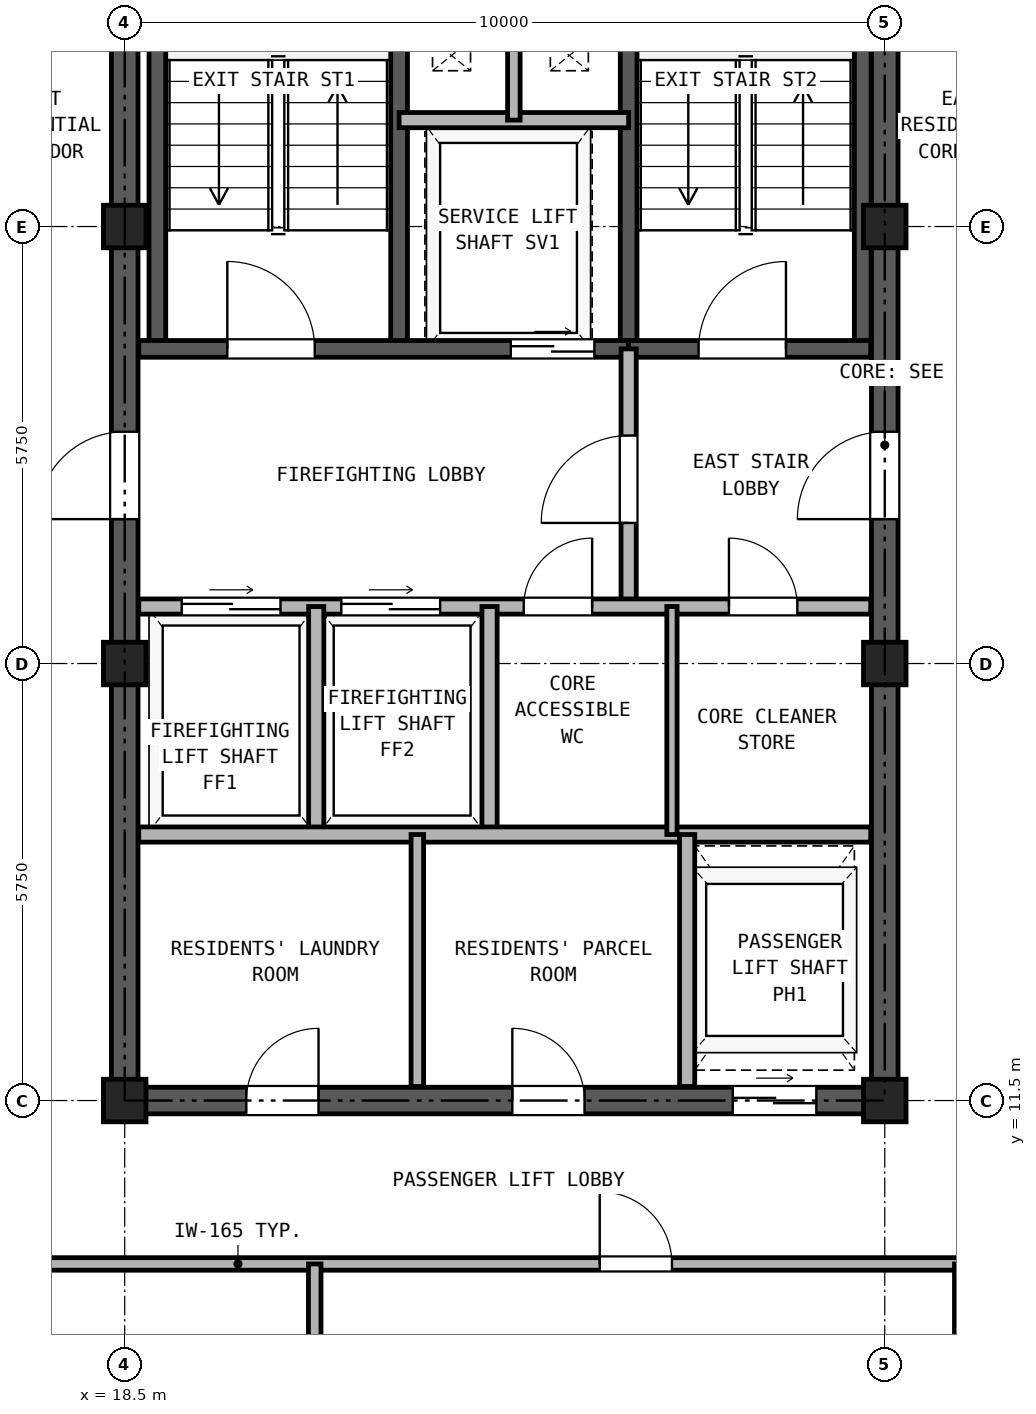
"""IFC4 building model, lengths in metres.
Left out: names, types, materials, properties, quantities, classifications, styles, units other than length and angle.
Written with IfcOpenShell. Run it as: python <this file> out.ifc"""

import sys

from ifc_helpers import new_model, si_unit, direction, frame, frame_2d, origin, origin_2d, place, context, subcontext, project, spatial, rectangle, hollow_rectangle, extrude, source, transform, mapped, element, fill, save


model = new_model("IFC4")
c1 = context("Model", 3, precision=1e-05, world=origin(), true_north=direction((0.0, 1.0)))
c2 = subcontext(c1, "Body", "Model", "MODEL_VIEW")
j1 = project(units=[si_unit("LENGTHUNIT", "METRE"), si_unit("PLANEANGLEUNIT", "RADIAN")], contexts=[c1])
p1 = place(None, origin())
s1 = spatial("IfcSite", under=j1, at=p1, CompositionType="ELEMENT")
p2 = place(p1, origin())
s2 = spatial("IfcBuilding", under=s1, at=p2, CompositionType="ELEMENT")
p3 = place(p2, frame((0.0, 0.0, 264.9)))
s3 = spatial("IfcBuildingStorey", under=s2, at=p3, CompositionType="ELEMENT", Elevation=264.9)
m1 = source(origin(), c2, "Body", "SweptSolid", [
    extrude(hollow_rectangle(XDim=0.56, YDim=0.56, WallThickness=0.03, at=origin_2d()), origin(), (0.0, 0.0, 1.0), 2.98),
])
for number, where, z_axis, x_axis in (
    (1, (18.5, 11.5, 0.0), (0.0, 0.0, 1.0), (1.0, 0.0, 0.0)),
    (2, (18.5, 17.25, 0.0), (0.0, 0.0, 1.0), (1.0, 0.0, 0.0)),
    (3, (18.5, 23.0, 0.0), (0.0, 0.0, 1.0), (1.0, 0.0, 0.0)),
    (4, (28.5, 11.5, 0.0), (0.0, 0.0, 1.0), (1.0, 0.0, 0.0)),
    (5, (28.5, 17.25, 0.0), (0.0, 0.0, 1.0), (1.0, 0.0, 0.0)),
    (6, (28.5, 23.0, 0.0), (0.0, 0.0, 1.0), (1.0, 0.0, 0.0)),
):
    element("IfcColumn", number, at=place(p3, frame(where, z_axis=z_axis, x_axis=x_axis)), inside=s3, PredefinedType="COLUMN", context=c2, shape_type="MappedRepresentation", body=[
        mapped(m1, transform((0.0, 0.0, 0.0), x_axis=(1.0, 0.0, 0.0), y_axis=(0.0, 1.0, 0.0), z_axis=(0.0, 0.0, 1.0), scale=1.0)),
    ])
p4 = place(p3, frame((18.325, 11.5, 0.0), z_axis=(0.0, 0.0, 1.0), x_axis=(1.0, 0.0, 0.0)))
e7 = element("IfcWall", 7, at=p4, inside=s3, PredefinedType="SHEAR", context=c2, shape_type="SweptSolid", body=[
    extrude(rectangle(XDim=10.35, YDim=0.35, at=frame_2d((5.175, 0.0))), origin(), (0.0, 0.0, 1.0), 2.98),
])
p5 = place(p4, frame((1.775, 0.0, 0.0)))
e8 = element("IfcOpeningElement", 8, at=p5, cuts=e7, PredefinedType="OPENING", context=c2, shape_type="SweptSolid", body=[
    extrude(rectangle(XDim=0.95, YDim=2.15, at=frame_2d((0.475, 1.075))), frame((0.0, 0.185, 0.0), z_axis=(0.0, -1.0, 0.0), x_axis=(1.0, 0.0, 0.0)), (0.0, 0.0, 1.0), 0.37),
])
p6 = place(p4, frame((5.275, 0.0, 0.0)))
e9 = element("IfcOpeningElement", 9, at=p6, cuts=e7, PredefinedType="OPENING", context=c2, shape_type="SweptSolid", body=[
    extrude(rectangle(XDim=0.95, YDim=2.15, at=frame_2d((0.475, 1.075))), frame((0.0, 0.185, 0.0), z_axis=(0.0, -1.0, 0.0), x_axis=(1.0, 0.0, 0.0)), (0.0, 0.0, 1.0), 0.37),
])
p7 = place(p4, frame((8.175, 0.0, 0.0)))
e10 = element("IfcOpeningElement", 10, at=p7, cuts=e7, PredefinedType="OPENING", context=c2, shape_type="SweptSolid", body=[
    extrude(rectangle(XDim=1.1, YDim=2.25, at=frame_2d((0.55, 1.125))), frame((0.0, 0.185, 0.0), z_axis=(0.0, -1.0, 0.0), x_axis=(1.0, 0.0, 0.0)), (0.0, 0.0, 1.0), 0.37),
])
p8 = place(p3, frame((18.5, 11.675, 0.0), z_axis=(0.0, 0.0, 1.0), x_axis=(0.0, 1.0, 0.0)))
e11 = element("IfcWall", 11, at=p8, inside=s3, PredefinedType="SHEAR", context=c2, shape_type="SweptSolid", body=[
    extrude(rectangle(XDim=16.9, YDim=0.35, at=frame_2d((8.45, 0.0))), origin(), (0.0, 0.0, 1.0), 2.98),
])
p9 = place(p8, frame((7.475, 0.0, 0.0)))
e12 = element("IfcOpeningElement", 12, at=p9, cuts=e11, PredefinedType="OPENING", context=c2, shape_type="SweptSolid", body=[
    extrude(rectangle(XDim=1.15, YDim=2.2, at=frame_2d((0.575, 1.1))), frame((0.0, 0.185, 0.0), z_axis=(0.0, -1.0, 0.0), x_axis=(1.0, 0.0, 0.0)), (0.0, 0.0, 1.0), 0.37),
])
p10 = place(p3, frame((28.5, 11.675, 0.0), z_axis=(0.0, 0.0, 1.0), x_axis=(0.0, 1.0, 0.0)))
e13 = element("IfcWall", 13, at=p10, inside=s3, PredefinedType="SHEAR", context=c2, shape_type="SweptSolid", body=[
    extrude(rectangle(XDim=16.9, YDim=0.35, at=frame_2d((8.45, 0.0))), origin(), (0.0, 0.0, 1.0), 2.98),
])
p11 = place(p10, frame((7.475, 0.0, 0.0)))
e14 = element("IfcOpeningElement", 14, at=p11, cuts=e13, PredefinedType="OPENING", context=c2, shape_type="SweptSolid", body=[
    extrude(rectangle(XDim=1.15, YDim=2.2, at=frame_2d((0.575, 1.1))), frame((0.0, 0.185, 0.0), z_axis=(0.0, -1.0, 0.0), x_axis=(1.0, 0.0, 0.0)), (0.0, 0.0, 1.0), 0.37),
])
for number, where, z_axis, x_axis in (
    (15, (18.93, 21.39, 0.0), (0.0, 0.0, 1.0), (0.0, 1.0, 0.0)),
    (16, (22.11, 21.39, 0.0), (0.0, 0.0, 1.0), (0.0, 1.0, 0.0)),
    (17, (25.13, 21.39, 0.0), (0.0, 0.0, 1.0), (0.0, 1.0, 0.0)),
):
    element("IfcWall", number, at=place(p3, frame(where, z_axis=z_axis, x_axis=x_axis)), inside=s3, PredefinedType="SOLIDWALL", context=c2, shape_type="SweptSolid", body=[
        extrude(rectangle(XDim=7.11, YDim=0.22, at=frame_2d((3.555, 0.0))), origin(), (0.0, 0.0, 1.0), 2.98),
    ])
p12 = place(p3, frame((28.21, 21.39, 0.0), z_axis=(0.0, 0.0, 1.0), x_axis=(0.0, 1.0, 0.0)))
e18 = element("IfcWall", 18, at=p12, inside=s3, PredefinedType="SOLIDWALL", context=c2, shape_type="SweptSolid", body=[
    extrude(rectangle(XDim=6.945, YDim=0.22, at=frame_2d((3.473, 0.0))), origin(), (0.0, 0.0, 1.0), 2.98),
])
p13 = place(p3, frame((18.685, 21.39, 0.0), z_axis=(0.0, 0.0, 1.0), x_axis=(1.0, 0.0, 0.0)))
e19 = element("IfcWall", 19, at=p13, inside=s3, PredefinedType="SOLIDWALL", context=c2, shape_type="SweptSolid", body=[
    extrude(rectangle(XDim=6.445, YDim=0.22, at=frame_2d((3.222, 0.0))), origin(), (0.0, 0.0, 1.0), 2.98),
])
p14 = place(p13, frame((1.165, 0.0, 0.0)))
e20 = element("IfcOpeningElement", 20, at=p14, cuts=e19, PredefinedType="OPENING", context=c2, shape_type="SweptSolid", body=[
    extrude(rectangle(XDim=1.15, YDim=2.2, at=frame_2d((0.575, 1.1))), frame((0.0, 0.12, 0.0), z_axis=(0.0, -1.0, 0.0), x_axis=(1.0, 0.0, 0.0)), (0.0, 0.0, 1.0), 0.24),
])
p15 = place(p13, frame((4.895, 0.0, 0.0)))
e21 = element("IfcOpeningElement", 21, at=p15, cuts=e19, PredefinedType="OPENING", context=c2, shape_type="SweptSolid", body=[
    extrude(rectangle(XDim=1.1, YDim=2.25, at=frame_2d((0.55, 1.125))), frame((0.0, 0.12, 0.0), z_axis=(0.0, -1.0, 0.0), x_axis=(1.0, 0.0, 0.0)), (0.0, 0.0, 1.0), 0.24),
])
p16 = place(p3, frame((25.13, 21.39, 0.0), z_axis=(0.0, 0.0, 1.0), x_axis=(1.0, 0.0, 0.0)))
e22 = element("IfcWall", 22, at=p16, inside=s3, PredefinedType="SOLIDWALL", context=c2, shape_type="SweptSolid", body=[
    extrude(rectangle(XDim=3.185, YDim=0.22, at=frame_2d((1.593, 0.0))), origin(), (0.0, 0.0, 1.0), 2.98),
])
p17 = place(p16, frame((0.92, 0.0, 0.0)))
e23 = element("IfcOpeningElement", 23, at=p17, cuts=e22, PredefinedType="OPENING", context=c2, shape_type="SweptSolid", body=[
    extrude(rectangle(XDim=1.15, YDim=2.2, at=frame_2d((0.575, 1.1))), frame((0.0, 0.12, 0.0), z_axis=(0.0, -1.0, 0.0), x_axis=(1.0, 0.0, 0.0)), (0.0, 0.0, 1.0), 0.24),
])
p18 = place(p3, frame((22.11, 24.4, 0.0), z_axis=(0.0, 0.0, 1.0), x_axis=(1.0, 0.0, 0.0)))
e24 = element("IfcWall", 24, at=p18, inside=s3, PredefinedType="PARTITIONING", context=c2, shape_type="SweptSolid", body=[
    extrude(rectangle(XDim=3.02, YDim=0.2, at=frame_2d((1.51, 0.0))), origin(), (0.0, 0.0, 1.0), 2.98),
])
p19 = place(p3, frame((23.62, 24.4, 0.0), z_axis=(0.0, 0.0, 1.0), x_axis=(0.0, 1.0, 0.0)))
e25 = element("IfcWall", 25, at=p19, inside=s3, PredefinedType="PARTITIONING", context=c2, shape_type="SweptSolid", body=[
    extrude(rectangle(XDim=4.165, YDim=0.165, at=frame_2d((2.083, 0.0))), origin(), (0.0, 0.0, 1.0), 2.98),
])
p20 = place(p3, frame((25.13, 18.0, 0.0), z_axis=(0.0, 0.0, 1.0), x_axis=(0.0, 1.0, 0.0)))
e26 = element("IfcWall", 26, at=p20, inside=s3, PredefinedType="PARTITIONING", context=c2, shape_type="SweptSolid", body=[
    extrude(rectangle(XDim=3.39, YDim=0.2, at=frame_2d((1.695, 0.0))), origin(), (0.0, 0.0, 1.0), 2.98),
])
p21 = place(p20, frame((1.1, 0.0, 0.0)))
e27 = element("IfcOpeningElement", 27, at=p21, cuts=e26, PredefinedType="OPENING", context=c2, shape_type="SweptSolid", body=[
    extrude(rectangle(XDim=1.15, YDim=2.2, at=frame_2d((0.575, 1.1))), frame((0.0, 0.11, 0.0), z_axis=(0.0, -1.0, 0.0), x_axis=(1.0, 0.0, 0.0)), (0.0, 0.0, 1.0), 0.22),
])
p22 = place(p3, frame((18.685, 18.0, 0.0), z_axis=(0.0, 0.0, 1.0), x_axis=(1.0, 0.0, 0.0)))
e28 = element("IfcWall", 28, at=p22, inside=s3, PredefinedType="PARTITIONING", context=c2, shape_type="SweptSolid", body=[
    extrude(rectangle(XDim=9.63, YDim=0.2, at=frame_2d((4.815, 0.0))), origin(), (0.0, 0.0, 1.0), 2.98),
])
p23 = place(p22, frame((0.565, 0.0, 0.0)))
e29 = element("IfcOpeningElement", 29, at=p23, cuts=e28, PredefinedType="OPENING", context=c2, shape_type="SweptSolid", body=[
    extrude(rectangle(XDim=1.3, YDim=2.3, at=frame_2d((0.65, 1.15))), frame((0.0, 0.11, 0.0), z_axis=(0.0, -1.0, 0.0), x_axis=(1.0, 0.0, 0.0)), (0.0, 0.0, 1.0), 0.22),
])
p24 = place(p22, frame((2.665, 0.0, 0.0)))
e30 = element("IfcOpeningElement", 30, at=p24, cuts=e28, PredefinedType="OPENING", context=c2, shape_type="SweptSolid", body=[
    extrude(rectangle(XDim=1.3, YDim=2.3, at=frame_2d((0.65, 1.15))), frame((0.0, 0.11, 0.0), z_axis=(0.0, -1.0, 0.0), x_axis=(1.0, 0.0, 0.0)), (0.0, 0.0, 1.0), 0.22),
])
p25 = place(p22, frame((5.065, 0.0, 0.0)))
e31 = element("IfcOpeningElement", 31, at=p25, cuts=e28, PredefinedType="OPENING", context=c2, shape_type="SweptSolid", body=[
    extrude(rectangle(XDim=0.9, YDim=2.05, at=frame_2d((0.45, 1.025))), frame((0.0, 0.11, 0.0), z_axis=(0.0, -1.0, 0.0), x_axis=(1.0, 0.0, 0.0)), (0.0, 0.0, 1.0), 0.22),
])
p26 = place(p22, frame((7.765, 0.0, 0.0)))
e32 = element("IfcOpeningElement", 32, at=p26, cuts=e28, PredefinedType="OPENING", context=c2, shape_type="SweptSolid", body=[
    extrude(rectangle(XDim=0.9, YDim=2.05, at=frame_2d((0.45, 1.025))), frame((0.0, 0.11, 0.0), z_axis=(0.0, -1.0, 0.0), x_axis=(1.0, 0.0, 0.0)), (0.0, 0.0, 1.0), 0.22),
])
for number, where, z_axis, x_axis in (
    (33, (21.02, 15.0, 0.0), (0.0, 0.0, 1.0), (0.0, 1.0, 0.0)),
    (34, (23.3, 15.0, 0.0), (0.0, 0.0, 1.0), (0.0, 1.0, 0.0)),
):
    element("IfcWall", number, at=place(p3, frame(where, z_axis=z_axis, x_axis=x_axis)), inside=s3, PredefinedType="PARTITIONING", context=c2, shape_type="SweptSolid", body=[
        extrude(rectangle(XDim=3.0, YDim=0.2, at=frame_2d((1.5, 0.0))), origin(), (0.0, 0.0, 1.0), 2.98),
    ])
p27 = place(p3, frame((18.685, 15.0, 0.0), z_axis=(0.0, 0.0, 1.0), x_axis=(1.0, 0.0, 0.0)))
e35 = element("IfcWall", 35, at=p27, inside=s3, PredefinedType="PARTITIONING", context=c2, shape_type="SweptSolid", body=[
    extrude(rectangle(XDim=9.63, YDim=0.2, at=frame_2d((4.815, 0.0))), origin(), (0.0, 0.0, 1.0), 2.98),
])
p28 = place(p3, frame((25.7, 15.0, 0.0), z_axis=(0.0, 0.0, 1.0), x_axis=(0.0, 1.0, 0.0)))
e36 = element("IfcWall", 36, at=p28, inside=s3, PredefinedType="PARTITIONING", context=c2, shape_type="SweptSolid", body=[
    extrude(rectangle(XDim=3.0, YDim=0.135, at=frame_2d((1.5, 0.0))), origin(), (0.0, 0.0, 1.0), 2.98),
])
p29 = place(p3, frame((22.35, 11.685, 0.0), z_axis=(0.0, 0.0, 1.0), x_axis=(0.0, 1.0, 0.0)))
e37 = element("IfcWall", 37, at=p29, inside=s3, PredefinedType="PARTITIONING", context=c2, shape_type="SweptSolid", body=[
    extrude(rectangle(XDim=3.315, YDim=0.165, at=frame_2d((1.657, 0.0))), origin(), (0.0, 0.0, 1.0), 2.98),
])
p30 = place(p3, frame((25.9, 11.685, 0.0), z_axis=(0.0, 0.0, 1.0), x_axis=(0.0, 1.0, 0.0)))
e38 = element("IfcWall", 38, at=p30, inside=s3, PredefinedType="PARTITIONING", context=c2, shape_type="SweptSolid", body=[
    extrude(rectangle(XDim=3.315, YDim=0.2, at=frame_2d((1.657, 0.0))), origin(), (0.0, 0.0, 1.0), 2.98),
])
p31 = place(p3, frame((5.36, 9.35, 0.0), z_axis=(0.0, 0.0, 1.0), x_axis=(1.0, 0.0, 0.0)))
e39 = element("IfcWall", 39, at=p31, inside=s3, PredefinedType="PARTITIONING", context=c2, shape_type="SweptSolid", body=[
    extrude(rectangle(XDim=36.28, YDim=0.165, at=frame_2d((18.14, 0.0))), origin(), (0.0, 0.0, 1.0), 2.98),
])
p32 = place(p31, frame((8.92, 0.0, 0.0)))
e40 = element("IfcOpeningElement", 40, at=p32, cuts=e39, PredefinedType="OPENING", context=c2, shape_type="SweptSolid", body=[
    extrude(rectangle(XDim=0.95, YDim=2.15, at=frame_2d((0.475, 1.075))), frame((0.0, 0.093, 0.0), z_axis=(0.0, -1.0, 0.0), x_axis=(1.0, 0.0, 0.0)), (0.0, 0.0, 1.0), 0.185),
])
p33 = place(p31, frame((19.39, 0.0, 0.0)))
e41 = element("IfcOpeningElement", 41, at=p33, cuts=e39, PredefinedType="OPENING", context=c2, shape_type="SweptSolid", body=[
    extrude(rectangle(XDim=0.95, YDim=2.15, at=frame_2d((0.475, 1.075))), frame((0.0, 0.093, 0.0), z_axis=(0.0, -1.0, 0.0), x_axis=(1.0, 0.0, 0.0)), (0.0, 0.0, 1.0), 0.185),
])
p34 = place(p31, frame((25.99, 0.0, 0.0)))
e42 = element("IfcOpeningElement", 42, at=p34, cuts=e39, PredefinedType="OPENING", context=c2, shape_type="SweptSolid", body=[
    extrude(rectangle(XDim=0.95, YDim=2.15, at=frame_2d((0.475, 1.075))), frame((0.0, 0.093, 0.0), z_axis=(0.0, -1.0, 0.0), x_axis=(1.0, 0.0, 0.0)), (0.0, 0.0, 1.0), 0.185),
])
p35 = place(p31, frame((30.34, 0.0, 0.0)))
e43 = element("IfcOpeningElement", 43, at=p35, cuts=e39, PredefinedType="OPENING", context=c2, shape_type="SweptSolid", body=[
    extrude(rectangle(XDim=0.95, YDim=2.15, at=frame_2d((0.475, 1.075))), frame((0.0, 0.093, 0.0), z_axis=(0.0, -1.0, 0.0), x_axis=(1.0, 0.0, 0.0)), (0.0, 0.0, 1.0), 0.185),
])
for number, where, z_axis, x_axis in (
    (44, (21.0, 0.16, 0.0), (0.0, 0.0, 1.0), (0.0, 1.0, 0.0)),
    (45, (29.5, 0.16, 0.0), (0.0, 0.0, 1.0), (0.0, 1.0, 0.0)),
):
    element("IfcWall", number, at=place(p3, frame(where, z_axis=z_axis, x_axis=x_axis)), inside=s3, PredefinedType="PARTITIONING", context=c2, shape_type="SweptSolid", body=[
        extrude(rectangle(XDim=9.19, YDim=0.165, at=frame_2d((4.595, 0.0))), origin(), (0.0, 0.0, 1.0), 2.98),
    ])
p36 = place(p14, frame((1.15, 0.0, 0.0), z_axis=(0.0, 0.0, 1.0), x_axis=(-1.0, 0.0, 0.0)))
e46 = element("IfcDoor", 46, at=p36, inside=s3, OperationType="SINGLE_SWING_LEFT", PredefinedType="DOOR", context=c2, shape_type="SweptSolid", body=[
    extrude(rectangle(XDim=1.15, YDim=2.2, at=frame_2d((0.575, 1.1))), frame((0.0, 0.025, 0.0), z_axis=(0.0, -1.0, 0.0), x_axis=(1.0, 0.0, 0.0)), (0.0, 0.0, 1.0), 0.05),
])
fill(e20, e46)
p37 = place(p17, frame((1.15, 0.0, 0.0), z_axis=(0.0, 0.0, 1.0), x_axis=(-1.0, 0.0, 0.0)))
e47 = element("IfcDoor", 47, at=p37, inside=s3, OperationType="SINGLE_SWING_RIGHT", PredefinedType="DOOR", context=c2, shape_type="SweptSolid", body=[
    extrude(rectangle(XDim=1.15, YDim=2.2, at=frame_2d((0.575, 1.1))), frame((0.0, 0.025, 0.0), z_axis=(0.0, -1.0, 0.0), x_axis=(1.0, 0.0, 0.0)), (0.0, 0.0, 1.0), 0.05),
])
fill(e23, e47)
p38 = place(p15, frame((1.1, 0.0, 0.0), z_axis=(0.0, 0.0, 1.0), x_axis=(-1.0, 0.0, 0.0)))
e48 = element("IfcDoor", 48, at=p38, inside=s3, OperationType="DOUBLE_DOOR_SLIDING", PredefinedType="DOOR", context=c2, shape_type="SweptSolid", body=[
    extrude(rectangle(XDim=1.1, YDim=2.25, at=frame_2d((0.55, 1.125))), frame((0.0, 0.025, 0.0), z_axis=(0.0, -1.0, 0.0), x_axis=(1.0, 0.0, 0.0)), (0.0, 0.0, 1.0), 0.05),
])
fill(e21, e48)
p39 = place(p21, origin())
e49 = element("IfcDoor", 49, at=p39, inside=s3, OperationType="SINGLE_SWING_LEFT", PredefinedType="DOOR", context=c2, shape_type="SweptSolid", body=[
    extrude(rectangle(XDim=1.15, YDim=2.2, at=frame_2d((0.575, 1.1))), frame((0.0, 0.025, 0.0), z_axis=(0.0, -1.0, 0.0), x_axis=(1.0, 0.0, 0.0)), (0.0, 0.0, 1.0), 0.05),
])
fill(e27, e49)
p40 = place(p23, origin())
e50 = element("IfcDoor", 50, at=p40, inside=s3, OperationType="DOUBLE_DOOR_SLIDING", PredefinedType="DOOR", context=c2, shape_type="SweptSolid", body=[
    extrude(rectangle(XDim=1.3, YDim=2.3, at=frame_2d((0.65, 1.15))), frame((0.0, 0.025, 0.0), z_axis=(0.0, -1.0, 0.0), x_axis=(1.0, 0.0, 0.0)), (0.0, 0.0, 1.0), 0.05),
])
fill(e29, e50)
p41 = place(p24, origin())
e51 = element("IfcDoor", 51, at=p41, inside=s3, OperationType="DOUBLE_DOOR_SLIDING", PredefinedType="DOOR", context=c2, shape_type="SweptSolid", body=[
    extrude(rectangle(XDim=1.3, YDim=2.3, at=frame_2d((0.65, 1.15))), frame((0.0, 0.025, 0.0), z_axis=(0.0, -1.0, 0.0), x_axis=(1.0, 0.0, 0.0)), (0.0, 0.0, 1.0), 0.05),
])
fill(e30, e51)
p42 = place(p25, frame((0.9, 0.0, 0.0), z_axis=(0.0, 0.0, 1.0), x_axis=(-1.0, 0.0, 0.0)))
e52 = element("IfcDoor", 52, at=p42, inside=s3, OperationType="SINGLE_SWING_RIGHT", PredefinedType="DOOR", context=c2, shape_type="SweptSolid", body=[
    extrude(rectangle(XDim=0.9, YDim=2.05, at=frame_2d((0.45, 1.025))), frame((0.0, 0.025, 0.0), z_axis=(0.0, -1.0, 0.0), x_axis=(1.0, 0.0, 0.0)), (0.0, 0.0, 1.0), 0.05),
])
fill(e31, e52)
p43 = place(p26, frame((0.9, 0.0, 0.0), z_axis=(0.0, 0.0, 1.0), x_axis=(-1.0, 0.0, 0.0)))
e53 = element("IfcDoor", 53, at=p43, inside=s3, OperationType="SINGLE_SWING_LEFT", PredefinedType="DOOR", context=c2, shape_type="SweptSolid", body=[
    extrude(rectangle(XDim=0.9, YDim=2.05, at=frame_2d((0.45, 1.025))), frame((0.0, 0.025, 0.0), z_axis=(0.0, -1.0, 0.0), x_axis=(1.0, 0.0, 0.0)), (0.0, 0.0, 1.0), 0.05),
])
fill(e32, e53)
p44 = place(p9, frame((1.15, 0.0, 0.0), z_axis=(0.0, 0.0, 1.0), x_axis=(-1.0, 0.0, 0.0)))
e54 = element("IfcDoor", 54, at=p44, inside=s3, OperationType="SINGLE_SWING_LEFT", PredefinedType="DOOR", context=c2, shape_type="SweptSolid", body=[
    extrude(rectangle(XDim=1.15, YDim=2.2, at=frame_2d((0.575, 1.1))), frame((0.0, 0.025, 0.0), z_axis=(0.0, -1.0, 0.0), x_axis=(1.0, 0.0, 0.0)), (0.0, 0.0, 1.0), 0.05),
])
fill(e12, e54)
p45 = place(p11, origin())
e55 = element("IfcDoor", 55, at=p45, inside=s3, OperationType="SINGLE_SWING_LEFT", PredefinedType="DOOR", context=c2, shape_type="SweptSolid", body=[
    extrude(rectangle(XDim=1.15, YDim=2.2, at=frame_2d((0.575, 1.1))), frame((0.0, 0.025, 0.0), z_axis=(0.0, -1.0, 0.0), x_axis=(1.0, 0.0, 0.0)), (0.0, 0.0, 1.0), 0.05),
])
fill(e14, e55)
p46 = place(p5, frame((0.95, 0.0, 0.0), z_axis=(0.0, 0.0, 1.0), x_axis=(-1.0, 0.0, 0.0)))
e56 = element("IfcDoor", 56, at=p46, inside=s3, OperationType="SINGLE_SWING_RIGHT", PredefinedType="DOOR", context=c2, shape_type="SweptSolid", body=[
    extrude(rectangle(XDim=0.95, YDim=2.15, at=frame_2d((0.475, 1.075))), frame((0.0, 0.025, 0.0), z_axis=(0.0, -1.0, 0.0), x_axis=(1.0, 0.0, 0.0)), (0.0, 0.0, 1.0), 0.05),
])
fill(e8, e56)
p47 = place(p6, frame((0.95, 0.0, 0.0), z_axis=(0.0, 0.0, 1.0), x_axis=(-1.0, 0.0, 0.0)))
e57 = element("IfcDoor", 57, at=p47, inside=s3, OperationType="SINGLE_SWING_LEFT", PredefinedType="DOOR", context=c2, shape_type="SweptSolid", body=[
    extrude(rectangle(XDim=0.95, YDim=2.15, at=frame_2d((0.475, 1.075))), frame((0.0, 0.025, 0.0), z_axis=(0.0, -1.0, 0.0), x_axis=(1.0, 0.0, 0.0)), (0.0, 0.0, 1.0), 0.05),
])
fill(e9, e57)
p48 = place(p7, frame((1.1, 0.0, 0.0), z_axis=(0.0, 0.0, 1.0), x_axis=(-1.0, 0.0, 0.0)))
e58 = element("IfcDoor", 58, at=p48, inside=s3, OperationType="DOUBLE_DOOR_SLIDING", PredefinedType="DOOR", context=c2, shape_type="SweptSolid", body=[
    extrude(rectangle(XDim=1.1, YDim=2.25, at=frame_2d((0.55, 1.125))), frame((0.0, 0.025, 0.0), z_axis=(0.0, -1.0, 0.0), x_axis=(1.0, 0.0, 0.0)), (0.0, 0.0, 1.0), 0.05),
])
fill(e10, e58)
p49 = place(p33, frame((0.95, 0.0, 0.0), z_axis=(0.0, 0.0, 1.0), x_axis=(-1.0, 0.0, 0.0)))
e59 = element("IfcDoor", 59, at=p49, inside=s3, OperationType="SINGLE_SWING_LEFT", PredefinedType="DOOR", context=c2, shape_type="SweptSolid", body=[
    extrude(rectangle(XDim=0.95, YDim=2.15, at=frame_2d((0.475, 1.075))), frame((0.0, 0.025, 0.0), z_axis=(0.0, -1.0, 0.0), x_axis=(1.0, 0.0, 0.0)), (0.0, 0.0, 1.0), 0.05),
])
fill(e41, e59)
save(model, sys.argv[1])
